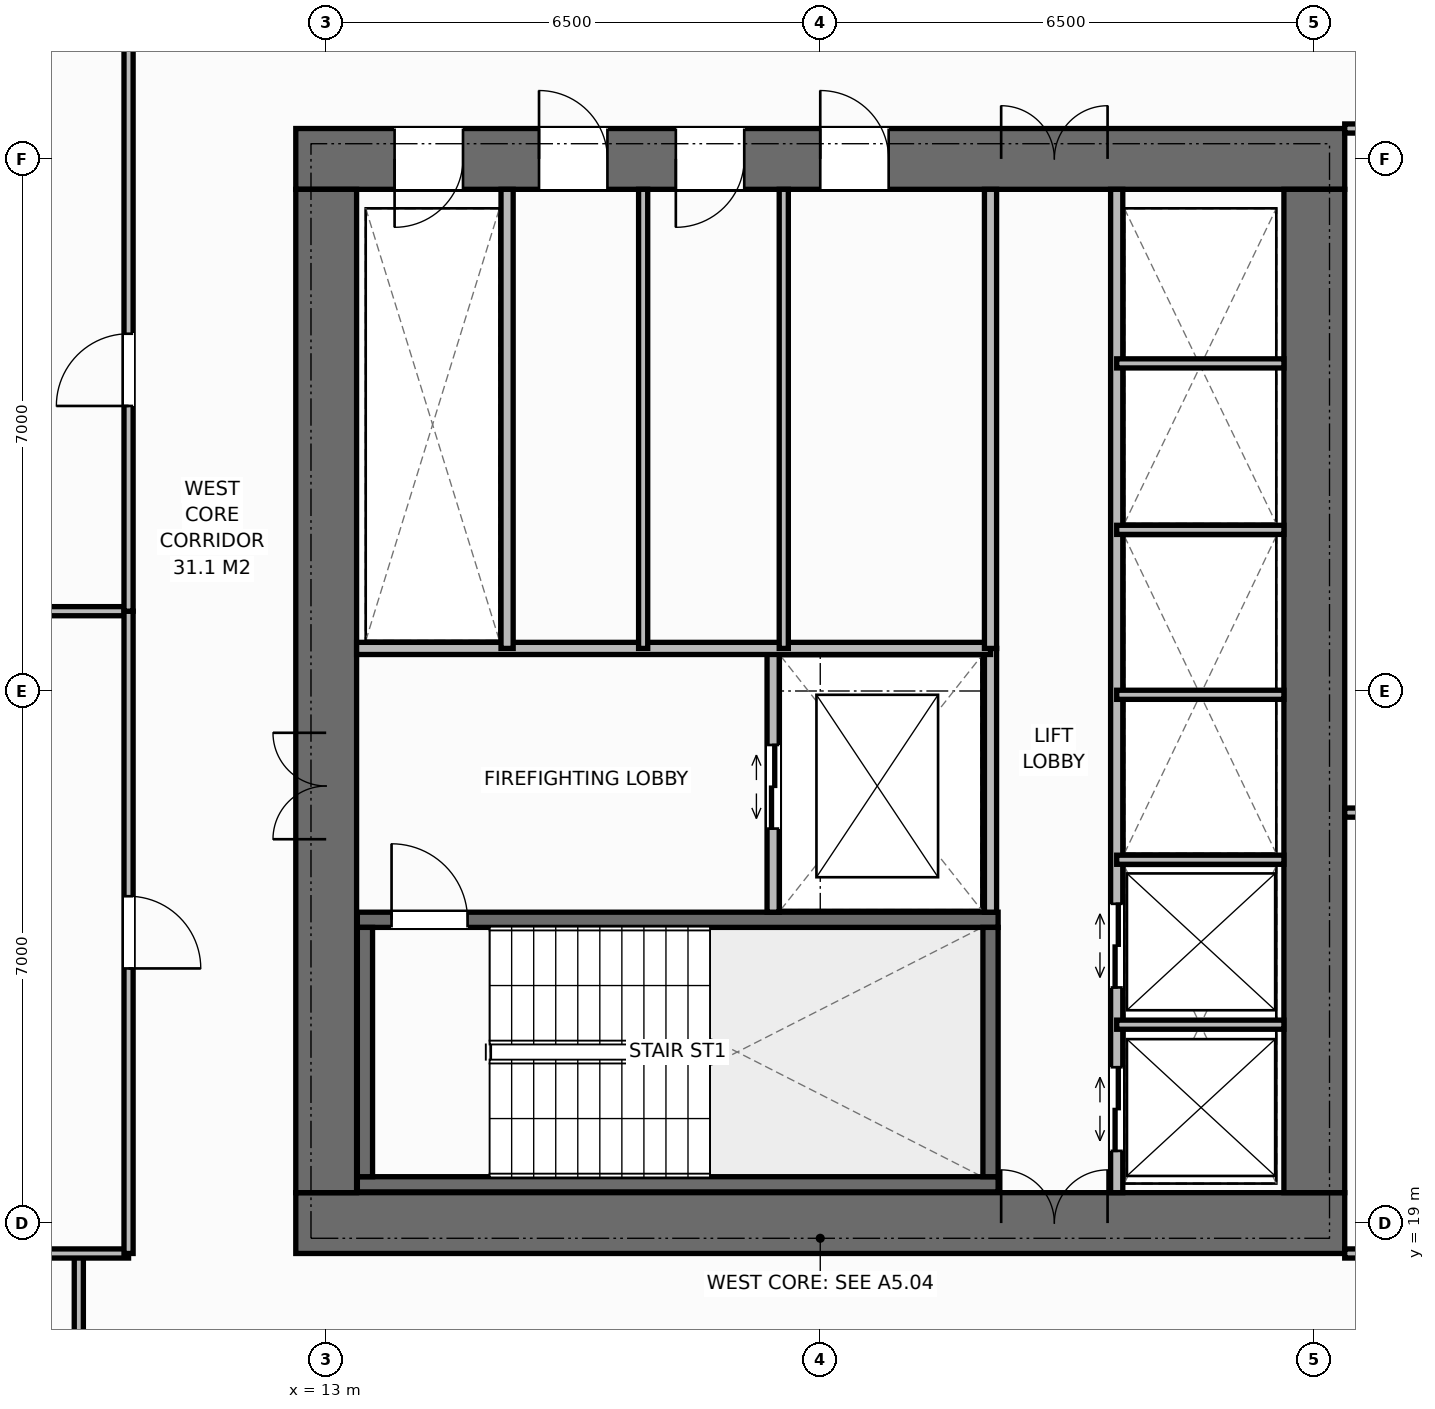
"""IFC4 building model, lengths in metres.
Left out: names, types, materials, properties, quantities, classifications, styles, units other than length and angle.
Written with IfcOpenShell. Run it as: python <this file> out.ifc"""

import sys

from ifc_helpers import new_model, si_unit, direction, frame, frame_2d, origin, place, context, subcontext, project, spatial, rectangle, extrude, element, fill, save


model = new_model("IFC4")
c1 = context("Model", 3, precision=1e-05, world=origin(), true_north=direction((0.0, 1.0)))
c2 = subcontext(c1, "Body", "Model", "MODEL_VIEW")
j1 = project(units=[si_unit("LENGTHUNIT", "METRE"), si_unit("PLANEANGLEUNIT", "RADIAN")], contexts=[c1])
p1 = place(None, origin())
s1 = spatial("IfcSite", under=j1, at=p1, CompositionType="ELEMENT")
p2 = place(p1, origin())
s2 = spatial("IfcBuilding", under=s1, at=p2, CompositionType="ELEMENT")
p3 = place(p2, frame((0.0, 0.0, 73.4)))
s3 = spatial("IfcBuildingStorey", under=s2, at=p3, CompositionType="ELEMENT", Elevation=73.4)
p4 = place(p3, frame((12.6, 19.0, 0.0), z_axis=(0.0, 0.0, 1.0), x_axis=(1.0, 0.0, 0.0)))
e1 = element("IfcWall", 1, at=p4, inside=s3, PredefinedType="SHEAR", context=c2, shape_type="SweptSolid", body=[
    extrude(rectangle(XDim=13.8, YDim=0.8, at=frame_2d((6.9, 0.0))), origin(), (0.0, 0.0, 1.0), 3.8),
])
p5 = place(p4, frame((9.28, 0.0, 0.0)))
e2 = element("IfcOpeningElement", 2, at=p5, cuts=e1, PredefinedType="OPENING", context=c2, shape_type="SweptSolid", body=[
    extrude(rectangle(XDim=1.4, YDim=2.2, at=frame_2d((0.7, 1.1))), frame((0.0, 0.41, 0.0), z_axis=(0.0, -1.0, 0.0), x_axis=(1.0, 0.0, 0.0)), (0.0, 0.0, 1.0), 0.82),
])
p6 = place(p3, frame((12.6, 33.0, 0.0), z_axis=(0.0, 0.0, 1.0), x_axis=(1.0, 0.0, 0.0)))
e3 = element("IfcWall", 3, at=p6, inside=s3, PredefinedType="SHEAR", context=c2, shape_type="SweptSolid", body=[
    extrude(rectangle(XDim=13.8, YDim=0.8, at=frame_2d((6.9, 0.0))), origin(), (0.0, 0.0, 1.0), 3.8),
])
p7 = place(p6, frame((1.3, 0.0, 0.0)))
e4 = element("IfcOpeningElement", 4, at=p7, cuts=e3, PredefinedType="OPENING", context=c2, shape_type="SweptSolid", body=[
    extrude(rectangle(XDim=0.9, YDim=2.15, at=frame_2d((0.45, 1.075))), frame((0.0, 0.41, 0.0), z_axis=(0.0, -1.0, 0.0), x_axis=(1.0, 0.0, 0.0)), (0.0, 0.0, 1.0), 0.82),
])
p8 = place(p6, frame((3.2, 0.0, 0.0)))
e5 = element("IfcOpeningElement", 5, at=p8, cuts=e3, PredefinedType="OPENING", context=c2, shape_type="SweptSolid", body=[
    extrude(rectangle(XDim=0.9, YDim=2.15, at=frame_2d((0.45, 1.075))), frame((0.0, 0.41, 0.0), z_axis=(0.0, -1.0, 0.0), x_axis=(1.0, 0.0, 0.0)), (0.0, 0.0, 1.0), 0.82),
])
p9 = place(p6, frame((5.0, 0.0, 0.0)))
e6 = element("IfcOpeningElement", 6, at=p9, cuts=e3, PredefinedType="OPENING", context=c2, shape_type="SweptSolid", body=[
    extrude(rectangle(XDim=0.9, YDim=2.15, at=frame_2d((0.45, 1.075))), frame((0.0, 0.41, 0.0), z_axis=(0.0, -1.0, 0.0), x_axis=(1.0, 0.0, 0.0)), (0.0, 0.0, 1.0), 0.82),
])
p10 = place(p6, frame((6.9, 0.0, 0.0)))
e7 = element("IfcOpeningElement", 7, at=p10, cuts=e3, PredefinedType="OPENING", context=c2, shape_type="SweptSolid", body=[
    extrude(rectangle(XDim=0.9, YDim=2.15, at=frame_2d((0.45, 1.075))), frame((0.0, 0.41, 0.0), z_axis=(0.0, -1.0, 0.0), x_axis=(1.0, 0.0, 0.0)), (0.0, 0.0, 1.0), 0.82),
])
p11 = place(p6, frame((9.28, 0.0, 0.0)))
e8 = element("IfcOpeningElement", 8, at=p11, cuts=e3, PredefinedType="OPENING", context=c2, shape_type="SweptSolid", body=[
    extrude(rectangle(XDim=1.4, YDim=2.2, at=frame_2d((0.7, 1.1))), frame((0.0, 0.41, 0.0), z_axis=(0.0, -1.0, 0.0), x_axis=(1.0, 0.0, 0.0)), (0.0, 0.0, 1.0), 0.82),
])
p12 = place(p3, frame((13.0, 19.4, 0.0), z_axis=(0.0, 0.0, 1.0), x_axis=(0.0, 1.0, 0.0)))
e9 = element("IfcWall", 9, at=p12, inside=s3, PredefinedType="SHEAR", context=c2, shape_type="SweptSolid", body=[
    extrude(rectangle(XDim=13.2, YDim=0.8, at=frame_2d((6.6, 0.0))), origin(), (0.0, 0.0, 1.0), 3.8),
])
p13 = place(p12, frame((4.65, 0.0, 0.0)))
e10 = element("IfcOpeningElement", 10, at=p13, cuts=e9, PredefinedType="OPENING", context=c2, shape_type="SweptSolid", body=[
    extrude(rectangle(XDim=1.4, YDim=2.2, at=frame_2d((0.7, 1.1))), frame((0.0, 0.41, 0.0), z_axis=(0.0, -1.0, 0.0), x_axis=(1.0, 0.0, 0.0)), (0.0, 0.0, 1.0), 0.82),
])
p14 = place(p3, frame((26.0, 19.4, 0.0), z_axis=(0.0, 0.0, 1.0), x_axis=(0.0, 1.0, 0.0)))
e11 = element("IfcWall", 11, at=p14, inside=s3, PredefinedType="SHEAR", context=c2, shape_type="SweptSolid", body=[
    extrude(rectangle(XDim=13.2, YDim=0.8, at=frame_2d((6.6, 0.0))), origin(), (0.0, 0.0, 1.0), 3.8),
])
p15 = place(p3, frame((13.41, 19.51, 0.0), z_axis=(0.0, 0.0, 1.0), x_axis=(1.0, 0.0, 0.0)))
e12 = element("IfcWall", 12, at=p15, inside=s3, PredefinedType="SHEAR", context=c2, shape_type="SweptSolid", body=[
    extrude(rectangle(XDim=8.43, YDim=0.2, at=frame_2d((4.215, 0.0))), origin(), (0.0, 0.0, 1.0), 3.8),
])
p16 = place(p3, frame((13.41, 22.99, 0.0), z_axis=(0.0, 0.0, 1.0), x_axis=(1.0, 0.0, 0.0)))
e13 = element("IfcWall", 13, at=p16, inside=s3, PredefinedType="SHEAR", context=c2, shape_type="SweptSolid", body=[
    extrude(rectangle(XDim=8.43, YDim=0.2, at=frame_2d((4.215, 0.0))), origin(), (0.0, 0.0, 1.0), 3.8),
])
p17 = place(p16, frame((0.45, 0.0, 0.0)))
e14 = element("IfcOpeningElement", 14, at=p17, cuts=e13, PredefinedType="OPENING", context=c2, shape_type="SweptSolid", body=[
    extrude(rectangle(XDim=1.0, YDim=2.15, at=frame_2d((0.5, 1.075))), frame((0.0, 0.11, 0.0), z_axis=(0.0, -1.0, 0.0), x_axis=(1.0, 0.0, 0.0)), (0.0, 0.0, 1.0), 0.22),
])
for number, where, z_axis, x_axis in (
    (15, (13.51, 19.61, 0.0), (0.0, 0.0, 1.0), (0.0, 1.0, 0.0)),
    (16, (21.74, 19.61, 0.0), (0.0, 0.0, 1.0), (0.0, 1.0, 0.0)),
):
    element("IfcWall", number, at=place(p3, frame(where, z_axis=z_axis, x_axis=x_axis)), inside=s3, PredefinedType="SHEAR", context=c2, shape_type="SweptSolid", body=[
        extrude(rectangle(XDim=3.28, YDim=0.2, at=frame_2d((1.64, 0.0))), origin(), (0.0, 0.0, 1.0), 3.8),
    ])
p18 = place(p3, frame((21.74, 23.09, 0.0), z_axis=(0.0, 0.0, 1.0), x_axis=(0.0, 1.0, 0.0)))
e17 = element("IfcWall", 17, at=p18, inside=s3, PredefinedType="STANDARD", context=c2, shape_type="SweptSolid", body=[
    extrude(rectangle(XDim=3.47, YDim=0.16, at=frame_2d((1.735, 0.0))), origin(), (0.0, 0.0, 1.0), 3.55),
])
p19 = place(p3, frame((18.88, 23.09, 0.0), z_axis=(0.0, 0.0, 1.0), x_axis=(0.0, 1.0, 0.0)))
e18 = element("IfcWall", 18, at=p19, inside=s3, PredefinedType="STANDARD", context=c2, shape_type="SweptSolid", body=[
    extrude(rectangle(XDim=3.47, YDim=0.16, at=frame_2d((1.735, 0.0))), origin(), (0.0, 0.0, 1.0), 3.55),
])
p20 = place(p19, frame((1.1, 0.0, 0.0)))
e19 = element("IfcOpeningElement", 19, at=p20, cuts=e18, PredefinedType="OPENING", context=c2, shape_type="SweptSolid", body=[
    extrude(rectangle(XDim=1.1, YDim=2.2, at=frame_2d((0.55, 1.1))), frame((0.0, 0.09, 0.0), z_axis=(0.0, -1.0, 0.0), x_axis=(1.0, 0.0, 0.0)), (0.0, 0.0, 1.0), 0.18),
])
p21 = place(p3, frame((13.4, 26.56, 0.0), z_axis=(0.0, 0.0, 1.0), x_axis=(1.0, 0.0, 0.0)))
e20 = element("IfcWall", 20, at=p21, inside=s3, PredefinedType="STANDARD", context=c2, shape_type="SweptSolid", body=[
    extrude(rectangle(XDim=8.34, YDim=0.16, at=frame_2d((4.17, 0.0))), origin(), (0.0, 0.0, 1.0), 3.55),
])
p22 = place(p3, frame((15.38, 26.56, 0.0), z_axis=(0.0, 0.0, 1.0), x_axis=(0.0, 1.0, 0.0)))
e21 = element("IfcWall", 21, at=p22, inside=s3, PredefinedType="STANDARD", context=c2, shape_type="SweptSolid", body=[
    extrude(rectangle(XDim=6.04, YDim=0.16, at=frame_2d((3.02, 0.0))), origin(), (0.0, 0.0, 1.0), 3.55),
])
for number, where, z_axis, x_axis in (
    (22, (17.17, 26.56, 0.0), (0.0, 0.0, 1.0), (0.0, 1.0, 0.0)),
    (23, (19.02, 26.56, 0.0), (0.0, 0.0, 1.0), (0.0, 1.0, 0.0)),
):
    element("IfcWall", number, at=place(p3, frame(where, z_axis=z_axis, x_axis=x_axis)), inside=s3, PredefinedType="PARTITIONING", context=c2, shape_type="SweptSolid", body=[
        extrude(rectangle(XDim=6.04, YDim=0.12, at=frame_2d((3.02, 0.0))), origin(), (0.0, 0.0, 1.0), 3.55),
    ])
p23 = place(p3, frame((21.74, 26.56, 0.0), z_axis=(0.0, 0.0, 1.0), x_axis=(0.0, 1.0, 0.0)))
e24 = element("IfcWall", 24, at=p23, inside=s3, PredefinedType="STANDARD", context=c2, shape_type="SweptSolid", body=[
    extrude(rectangle(XDim=6.04, YDim=0.16, at=frame_2d((3.02, 0.0))), origin(), (0.0, 0.0, 1.0), 3.55),
])
p24 = place(p3, frame((23.4, 19.4, 0.0), z_axis=(0.0, 0.0, 1.0), x_axis=(0.0, 1.0, 0.0)))
e25 = element("IfcWall", 25, at=p24, inside=s3, PredefinedType="STANDARD", context=c2, shape_type="SweptSolid", body=[
    extrude(rectangle(XDim=13.2, YDim=0.16, at=frame_2d((6.6, 0.0))), origin(), (0.0, 0.0, 1.0), 3.55),
])
p25 = place(p24, frame((0.55, 0.0, 0.0)))
e26 = element("IfcOpeningElement", 26, at=p25, cuts=e25, PredefinedType="OPENING", context=c2, shape_type="SweptSolid", body=[
    extrude(rectangle(XDim=1.1, YDim=2.2, at=frame_2d((0.55, 1.1))), frame((0.0, 0.09, 0.0), z_axis=(0.0, -1.0, 0.0), x_axis=(1.0, 0.0, 0.0)), (0.0, 0.0, 1.0), 0.18),
])
p26 = place(p24, frame((2.7, 0.0, 0.0)))
e27 = element("IfcOpeningElement", 27, at=p26, cuts=e25, PredefinedType="OPENING", context=c2, shape_type="SweptSolid", body=[
    extrude(rectangle(XDim=1.1, YDim=2.2, at=frame_2d((0.55, 1.1))), frame((0.0, 0.09, 0.0), z_axis=(0.0, -1.0, 0.0), x_axis=(1.0, 0.0, 0.0)), (0.0, 0.0, 1.0), 0.18),
])
for number, where, z_axis, x_axis in (
    (28, (23.4, 21.61, 0.0), (0.0, 0.0, 1.0), (1.0, 0.0, 0.0)),
    (29, (23.4, 23.78, 0.0), (0.0, 0.0, 1.0), (1.0, 0.0, 0.0)),
    (30, (23.4, 25.95, 0.0), (0.0, 0.0, 1.0), (1.0, 0.0, 0.0)),
    (31, (23.4, 28.12, 0.0), (0.0, 0.0, 1.0), (1.0, 0.0, 0.0)),
    (32, (23.4, 30.31, 0.0), (0.0, 0.0, 1.0), (1.0, 0.0, 0.0)),
):
    element("IfcWall", number, at=place(p3, frame(where, z_axis=z_axis, x_axis=x_axis)), inside=s3, PredefinedType="PARTITIONING", context=c2, shape_type="SweptSolid", body=[
        extrude(rectangle(XDim=2.2, YDim=0.12, at=frame_2d((1.1, 0.0))), origin(), (0.0, 0.0, 1.0), 3.55),
    ])
p27 = place(p3, frame((26.4, 24.4, 0.0), z_axis=(0.0, 0.0, 1.0), x_axis=(1.0, 0.0, 0.0)))
e33 = element("IfcWall", 33, at=p27, inside=s3, PredefinedType="PARTITIONING", context=c2, shape_type="SweptSolid", body=[
    extrude(rectangle(XDim=3.6, YDim=0.12, at=frame_2d((1.8, 0.0))), origin(), (0.0, 0.0, 1.0), 3.55),
])
p28 = place(p3, frame((26.4, 18.6, 0.0), z_axis=(0.0, 0.0, 1.0), x_axis=(1.0, 0.0, 0.0)))
e34 = element("IfcWall", 34, at=p28, inside=s3, PredefinedType="PARTITIONING", context=c2, shape_type="SweptSolid", body=[
    extrude(rectangle(XDim=3.6, YDim=0.12, at=frame_2d((1.8, 0.0))), origin(), (0.0, 0.0, 1.0), 3.55),
])
p29 = place(p28, frame((1.1, 0.0, 0.0)))
e35 = element("IfcOpeningElement", 35, at=p29, cuts=e34, PredefinedType="OPENING", context=c2, shape_type="SweptSolid", body=[
    extrude(rectangle(XDim=0.95, YDim=2.15, at=frame_2d((0.475, 1.075))), frame((0.0, 0.07, 0.0), z_axis=(0.0, -1.0, 0.0), x_axis=(1.0, 0.0, 0.0)), (0.0, 0.0, 1.0), 0.14),
])
p30 = place(p3, frame((26.4, 33.4, 0.0), z_axis=(0.0, 0.0, 1.0), x_axis=(1.0, 0.0, 0.0)))
e36 = element("IfcWall", 36, at=p30, inside=s3, PredefinedType="PARTITIONING", context=c2, shape_type="SweptSolid", body=[
    extrude(rectangle(XDim=3.6, YDim=0.12, at=frame_2d((1.8, 0.0))), origin(), (0.0, 0.0, 1.0), 3.55),
])
p31 = place(p30, frame((1.1, 0.0, 0.0)))
e37 = element("IfcOpeningElement", 37, at=p31, cuts=e36, PredefinedType="OPENING", context=c2, shape_type="SweptSolid", body=[
    extrude(rectangle(XDim=0.95, YDim=2.15, at=frame_2d((0.475, 1.075))), frame((0.0, 0.07, 0.0), z_axis=(0.0, -1.0, 0.0), x_axis=(1.0, 0.0, 0.0)), (0.0, 0.0, 1.0), 0.14),
])
p32 = place(p3, frame((9.746, 16.5, 0.0), z_axis=(0.0, 0.0, 1.0), x_axis=(0.0, 1.0, 0.0)))
e38 = element("IfcWall", 38, at=p32, inside=s3, PredefinedType="PARTITIONING", context=c2, shape_type="SweptSolid", body=[
    extrude(rectangle(XDim=2.1, YDim=0.12, at=frame_2d((1.05, 0.0))), origin(), (0.0, 0.0, 1.0), 3.55),
])
for number, where, z_axis, x_axis in (
    (39, (-0.18, 18.6, 0.0), (0.0, 0.0, 1.0), (1.0, 0.0, 0.0)),
    (40, (-0.18, 27.05, 0.0), (0.0, 0.0, 1.0), (1.0, 0.0, 0.0)),
):
    element("IfcWall", number, at=place(p3, frame(where, z_axis=z_axis, x_axis=x_axis)), inside=s3, PredefinedType="PARTITIONING", context=c2, shape_type="SweptSolid", body=[
        extrude(rectangle(XDim=10.58, YDim=0.12, at=frame_2d((5.29, 0.0))), origin(), (0.0, 0.0, 1.0), 3.55),
    ])
p33 = place(p3, frame((10.4, 18.6, 0.0), z_axis=(0.0, 0.0, 1.0), x_axis=(0.0, 1.0, 0.0)))
e41 = element("IfcWall", 41, at=p33, inside=s3, PredefinedType="PARTITIONING", context=c2, shape_type="SweptSolid", body=[
    extrude(rectangle(XDim=8.45, YDim=0.12, at=frame_2d((4.225, 0.0))), origin(), (0.0, 0.0, 1.0), 3.55),
])
p34 = place(p33, frame((3.75, 0.0, 0.0)))
e42 = element("IfcOpeningElement", 42, at=p34, cuts=e41, PredefinedType="OPENING", context=c2, shape_type="SweptSolid", body=[
    extrude(rectangle(XDim=0.95, YDim=2.15, at=frame_2d((0.475, 1.075))), frame((0.0, 0.07, 0.0), z_axis=(0.0, -1.0, 0.0), x_axis=(1.0, 0.0, 0.0)), (0.0, 0.0, 1.0), 0.14),
])
p35 = place(p3, frame((10.4, 27.05, 0.0), z_axis=(0.0, 0.0, 1.0), x_axis=(0.0, 1.0, 0.0)))
e43 = element("IfcWall", 43, at=p35, inside=s3, PredefinedType="PARTITIONING", context=c2, shape_type="SweptSolid", body=[
    extrude(rectangle(XDim=8.45, YDim=0.12, at=frame_2d((4.225, 0.0))), origin(), (0.0, 0.0, 1.0), 3.55),
])
p36 = place(p35, frame((2.7, 0.0, 0.0)))
e44 = element("IfcOpeningElement", 44, at=p36, cuts=e43, PredefinedType="OPENING", context=c2, shape_type="SweptSolid", body=[
    extrude(rectangle(XDim=0.95, YDim=2.15, at=frame_2d((0.475, 1.075))), frame((0.0, 0.07, 0.0), z_axis=(0.0, -1.0, 0.0), x_axis=(1.0, 0.0, 0.0)), (0.0, 0.0, 1.0), 0.14),
])
p37 = place(p17, origin())
e45 = element("IfcDoor", 45, at=p37, inside=s3, OperationType="SINGLE_SWING_LEFT", PredefinedType="DOOR", context=c2, shape_type="SweptSolid", body=[
    extrude(rectangle(XDim=1.0, YDim=2.15, at=frame_2d((0.5, 1.075))), frame((0.0, 0.025, 0.0), z_axis=(0.0, -1.0, 0.0), x_axis=(1.0, 0.0, 0.0)), (0.0, 0.0, 1.0), 0.05),
])
fill(e14, e45)
p38 = place(p13, origin())
e46 = element("IfcDoor", 46, at=p38, inside=s3, OperationType="DOUBLE_DOOR_SINGLE_SWING", PredefinedType="DOOR", context=c2, shape_type="SweptSolid", body=[
    extrude(rectangle(XDim=1.4, YDim=2.2, at=frame_2d((0.7, 1.1))), frame((0.0, 0.025, 0.0), z_axis=(0.0, -1.0, 0.0), x_axis=(1.0, 0.0, 0.0)), (0.0, 0.0, 1.0), 0.05),
])
fill(e10, e46)
p39 = place(p20, origin())
e47 = element("IfcDoor", 47, at=p39, inside=s3, OperationType="DOUBLE_DOOR_SLIDING", PredefinedType="DOOR", context=c2, shape_type="SweptSolid", body=[
    extrude(rectangle(XDim=1.1, YDim=2.2, at=frame_2d((0.55, 1.1))), frame((0.0, 0.025, 0.0), z_axis=(0.0, -1.0, 0.0), x_axis=(1.0, 0.0, 0.0)), (0.0, 0.0, 1.0), 0.05),
])
fill(e19, e47)
p40 = place(p7, origin())
e48 = element("IfcDoor", 48, at=p40, inside=s3, OperationType="SINGLE_SWING_RIGHT", PredefinedType="DOOR", context=c2, shape_type="SweptSolid", body=[
    extrude(rectangle(XDim=0.9, YDim=2.15, at=frame_2d((0.45, 1.075))), frame((0.0, -0.075, 0.0), z_axis=(0.0, -1.0, 0.0), x_axis=(1.0, 0.0, 0.0)), (0.0, 0.0, 1.0), 0.05),
])
fill(e4, e48)
p41 = place(p8, origin())
e49 = element("IfcDoor", 49, at=p41, inside=s3, OperationType="SINGLE_SWING_LEFT", PredefinedType="DOOR", context=c2, shape_type="SweptSolid", body=[
    extrude(rectangle(XDim=0.9, YDim=2.15, at=frame_2d((0.45, 1.075))), frame((0.0, -0.075, 0.0), z_axis=(0.0, -1.0, 0.0), x_axis=(1.0, 0.0, 0.0)), (0.0, 0.0, 1.0), 0.05),
])
fill(e5, e49)
p42 = place(p9, origin())
e50 = element("IfcDoor", 50, at=p42, inside=s3, OperationType="SINGLE_SWING_RIGHT", PredefinedType="DOOR", context=c2, shape_type="SweptSolid", body=[
    extrude(rectangle(XDim=0.9, YDim=2.15, at=frame_2d((0.45, 1.075))), frame((0.0, -0.075, 0.0), z_axis=(0.0, -1.0, 0.0), x_axis=(1.0, 0.0, 0.0)), (0.0, 0.0, 1.0), 0.05),
])
fill(e6, e50)
p43 = place(p10, origin())
e51 = element("IfcDoor", 51, at=p43, inside=s3, OperationType="SINGLE_SWING_LEFT", PredefinedType="DOOR", context=c2, shape_type="SweptSolid", body=[
    extrude(rectangle(XDim=0.9, YDim=2.15, at=frame_2d((0.45, 1.075))), frame((0.0, -0.075, 0.0), z_axis=(0.0, -1.0, 0.0), x_axis=(1.0, 0.0, 0.0)), (0.0, 0.0, 1.0), 0.05),
])
fill(e7, e51)
p44 = place(p5, origin())
e52 = element("IfcDoor", 52, at=p44, inside=s3, OperationType="DOUBLE_DOOR_SINGLE_SWING", PredefinedType="DOOR", context=c2, shape_type="SweptSolid", body=[
    extrude(rectangle(XDim=1.4, YDim=2.2, at=frame_2d((0.7, 1.1))), frame((0.0, 0.125, 0.0), z_axis=(0.0, -1.0, 0.0), x_axis=(1.0, 0.0, 0.0)), (0.0, 0.0, 1.0), 0.05),
])
fill(e2, e52)
p45 = place(p11, origin())
e53 = element("IfcDoor", 53, at=p45, inside=s3, OperationType="DOUBLE_DOOR_SINGLE_SWING", PredefinedType="DOOR", context=c2, shape_type="SweptSolid", body=[
    extrude(rectangle(XDim=1.4, YDim=2.2, at=frame_2d((0.7, 1.1))), frame((0.0, -0.075, 0.0), z_axis=(0.0, -1.0, 0.0), x_axis=(1.0, 0.0, 0.0)), (0.0, 0.0, 1.0), 0.05),
])
fill(e8, e53)
p46 = place(p25, origin())
e54 = element("IfcDoor", 54, at=p46, inside=s3, OperationType="DOUBLE_DOOR_SLIDING", PredefinedType="DOOR", context=c2, shape_type="SweptSolid", body=[
    extrude(rectangle(XDim=1.1, YDim=2.2, at=frame_2d((0.55, 1.1))), frame((0.0, 0.025, 0.0), z_axis=(0.0, -1.0, 0.0), x_axis=(1.0, 0.0, 0.0)), (0.0, 0.0, 1.0), 0.05),
])
fill(e26, e54)
p47 = place(p26, origin())
e55 = element("IfcDoor", 55, at=p47, inside=s3, OperationType="DOUBLE_DOOR_SLIDING", PredefinedType="DOOR", context=c2, shape_type="SweptSolid", body=[
    extrude(rectangle(XDim=1.1, YDim=2.2, at=frame_2d((0.55, 1.1))), frame((0.0, 0.025, 0.0), z_axis=(0.0, -1.0, 0.0), x_axis=(1.0, 0.0, 0.0)), (0.0, 0.0, 1.0), 0.05),
])
fill(e27, e55)
p48 = place(p34, origin())
e56 = element("IfcDoor", 56, at=p48, inside=s3, OperationType="SINGLE_SWING_RIGHT", PredefinedType="DOOR", context=c2, shape_type="SweptSolid", body=[
    extrude(rectangle(XDim=0.95, YDim=2.15, at=frame_2d((0.475, 1.075))), frame((0.0, 0.025, 0.0), z_axis=(0.0, -1.0, 0.0), x_axis=(1.0, 0.0, 0.0)), (0.0, 0.0, 1.0), 0.05),
])
fill(e42, e56)
p49 = place(p36, origin())
e57 = element("IfcDoor", 57, at=p49, inside=s3, OperationType="SINGLE_SWING_LEFT", PredefinedType="DOOR", context=c2, shape_type="SweptSolid", body=[
    extrude(rectangle(XDim=0.95, YDim=2.15, at=frame_2d((0.475, 1.075))), frame((0.0, 0.025, 0.0), z_axis=(0.0, -1.0, 0.0), x_axis=(1.0, 0.0, 0.0)), (0.0, 0.0, 1.0), 0.05),
])
fill(e44, e57)
save(model, sys.argv[1])
